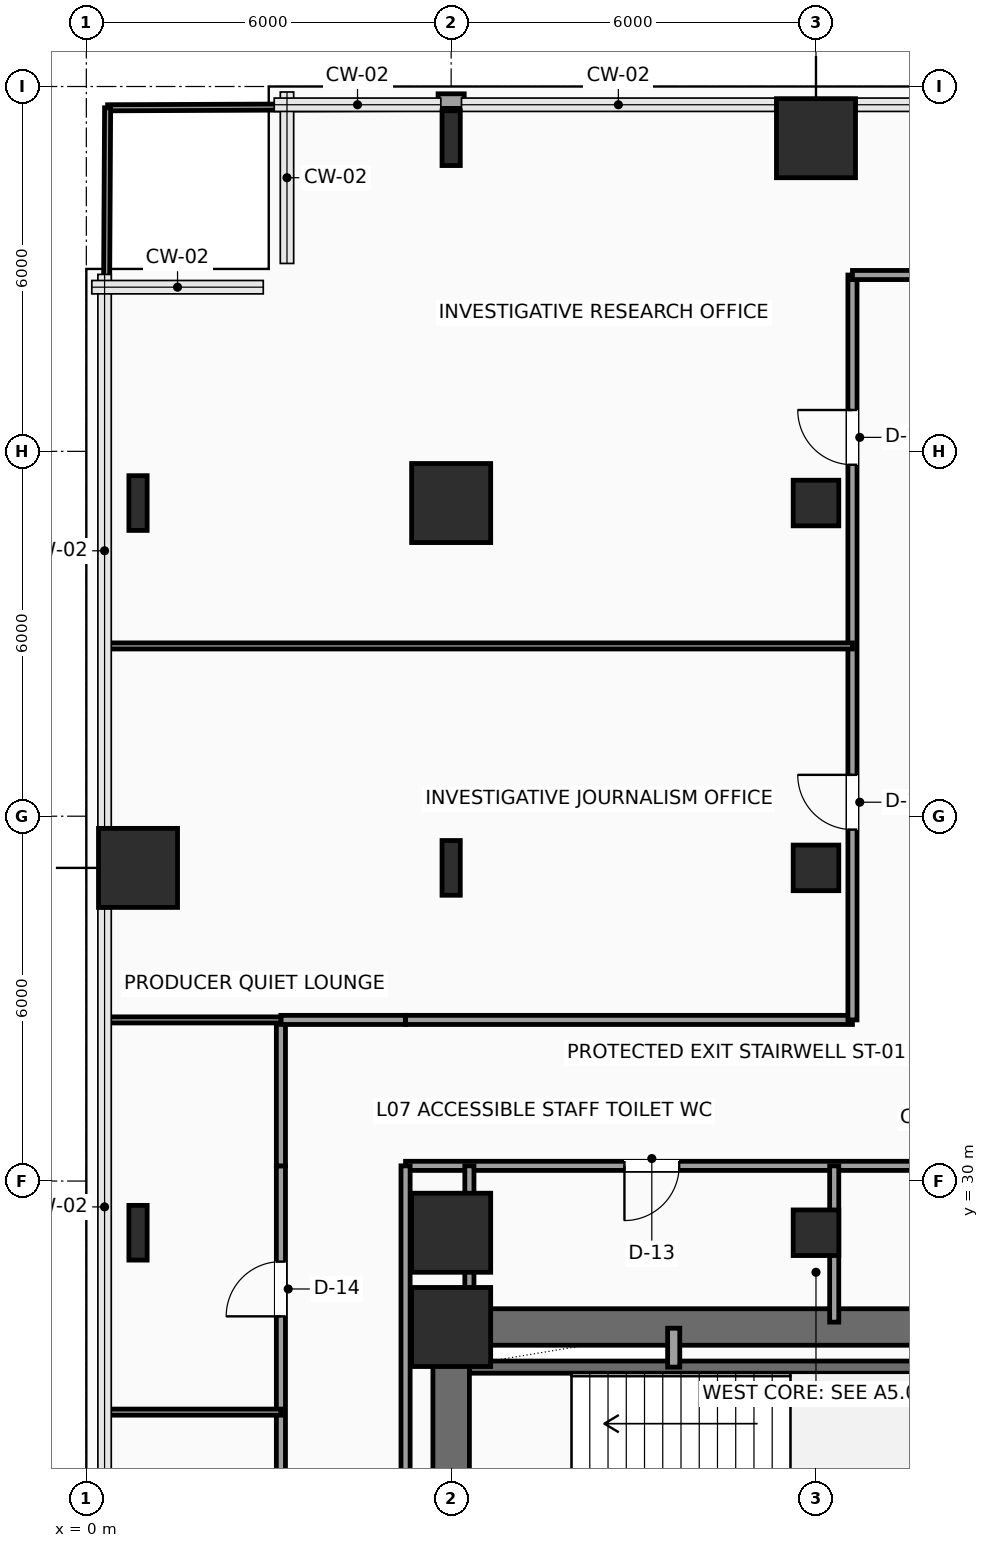
"""IFC4 building model, lengths in metres.
Left out: names, types, materials, properties, quantities, classifications, styles, units other than length and angle.
Written with IfcOpenShell. Run it as: python <this file> out.ifc"""

import sys

from ifc_helpers import new_model, si_unit, direction, frame, frame_2d, origin, origin_2d, place, context, subcontext, project, spatial, rectangle, hollow_rectangle, i_section, extrude, element, fill, save


model = new_model("IFC4")
c1 = context("Model", 3, precision=1e-05, world=origin(), true_north=direction((0.0, 1.0)))
c2 = subcontext(c1, "Body", "Model", "MODEL_VIEW")
j1 = project(units=[si_unit("LENGTHUNIT", "METRE"), si_unit("PLANEANGLEUNIT", "RADIAN")], contexts=[c1])
p1 = place(None, origin())
s1 = spatial("IfcSite", under=j1, at=p1, CompositionType="ELEMENT")
p2 = place(p1, origin())
s2 = spatial("IfcBuilding", under=s1, at=p2, CompositionType="ELEMENT")
p3 = place(p2, frame((0.0, 0.0, 36.3)))
s3 = spatial("IfcBuildingStorey", under=s2, at=p3, CompositionType="ELEMENT", Elevation=36.3)
p4 = place(p3, frame((6.0, 27.6, 0.0), z_axis=(0.0, 0.0, 1.0), x_axis=(1.0, 0.0, 0.0)))
e1 = element("IfcColumn", 1, at=p4, inside=s3, PredefinedType="COLUMN", context=c2, shape_type="SweptSolid", body=[
    extrude(rectangle(XDim=1.3, YDim=1.3, at=origin_2d()), origin(), (0.0, 0.0, 1.0), 3.9),
])
p5 = place(p3, frame((0.85, 29.15, 0.0), z_axis=(0.0, 0.0, 1.0), x_axis=(1.0, 0.0, 0.0)))
e2 = element("IfcColumn", 2, at=p5, inside=s3, PredefinedType="COLUMN", context=c2, shape_type="SweptSolid", body=[
    extrude(i_section(OverallWidth=0.3, OverallDepth=0.9, WebThickness=0.019, FlangeThickness=0.035, FilletRadius=0.03, at=origin_2d()), origin(), (0.0, 0.0, 1.0), 3.9),
])
p6 = place(p3, frame((0.85, 35.15, 0.0), z_axis=(0.0, 0.0, 1.0), x_axis=(1.0, 0.0, 0.0)))
e3 = element("IfcColumn", 3, at=p6, inside=s3, PredefinedType="COLUMN", context=c2, shape_type="SweptSolid", body=[
    extrude(rectangle(XDim=1.3, YDim=1.3, at=origin_2d()), origin(), (0.0, 0.0, 1.0), 3.9),
])
p7 = place(p3, frame((0.85, 41.15, 0.0), z_axis=(0.0, 0.0, 1.0), x_axis=(1.0, 0.0, 0.0)))
e4 = element("IfcColumn", 4, at=p7, inside=s3, PredefinedType="COLUMN", context=c2, shape_type="SweptSolid", body=[
    extrude(i_section(OverallWidth=0.3, OverallDepth=0.9, WebThickness=0.019, FlangeThickness=0.035, FilletRadius=0.03, at=origin_2d()), origin(), (0.0, 0.0, 1.0), 3.9),
])
p8 = place(p3, frame((6.0, 29.15, 0.0), z_axis=(0.0, 0.0, 1.0), x_axis=(1.0, 0.0, 0.0)))
e5 = element("IfcColumn", 5, at=p8, inside=s3, PredefinedType="COLUMN", context=c2, shape_type="SweptSolid", body=[
    extrude(rectangle(XDim=1.3, YDim=1.3, at=origin_2d()), origin(), (0.0, 0.0, 1.0), 3.9),
])
p9 = place(p3, frame((6.0, 35.15, 0.0), z_axis=(0.0, 0.0, 1.0), x_axis=(1.0, 0.0, 0.0)))
e6 = element("IfcColumn", 6, at=p9, inside=s3, PredefinedType="COLUMN", context=c2, shape_type="SweptSolid", body=[
    extrude(i_section(OverallWidth=0.3, OverallDepth=0.9, WebThickness=0.019, FlangeThickness=0.035, FilletRadius=0.03, at=origin_2d()), origin(), (0.0, 0.0, 1.0), 3.9),
])
p10 = place(p3, frame((6.0, 41.15, 0.0), z_axis=(0.0, 0.0, 1.0), x_axis=(1.0, 0.0, 0.0)))
e7 = element("IfcColumn", 7, at=p10, inside=s3, PredefinedType="COLUMN", context=c2, shape_type="SweptSolid", body=[
    extrude(rectangle(XDim=1.3, YDim=1.3, at=origin_2d()), origin(), (0.0, 0.0, 1.0), 3.9),
])
p11 = place(p3, frame((6.0, 47.15, 0.0), z_axis=(0.0, 0.0, 1.0), x_axis=(1.0, 0.0, 0.0)))
e8 = element("IfcColumn", 8, at=p11, inside=s3, PredefinedType="COLUMN", context=c2, shape_type="SweptSolid", body=[
    extrude(i_section(OverallWidth=0.3, OverallDepth=0.9, WebThickness=0.019, FlangeThickness=0.035, FilletRadius=0.03, at=origin_2d()), origin(), (0.0, 0.0, 1.0), 3.9),
])
for number, where, z_axis, x_axis in (
    (9, (12.0, 29.15, 0.0), (0.0, 0.0, 1.0), (1.0, 0.0, 0.0)),
    (10, (12.0, 35.15, 0.0), (0.0, 0.0, 1.0), (1.0, 0.0, 0.0)),
    (11, (12.0, 41.15, 0.0), (0.0, 0.0, 1.0), (1.0, 0.0, 0.0)),
):
    element("IfcColumn", number, at=place(p3, frame(where, z_axis=z_axis, x_axis=x_axis)), inside=s3, PredefinedType="COLUMN", context=c2, shape_type="SweptSolid", body=[
        extrude(hollow_rectangle(XDim=0.75, YDim=0.75, WallThickness=0.035, InnerFilletRadius=0.035, OuterFilletRadius=0.05, at=origin_2d()), origin(), (0.0, 0.0, 1.0), 3.9),
    ])
p12 = place(p3, frame((12.0, 47.15, 0.0), z_axis=(0.0, 0.0, 1.0), x_axis=(1.0, 0.0, 0.0)))
e12 = element("IfcColumn", 12, at=p12, inside=s3, PredefinedType="COLUMN", context=c2, shape_type="SweptSolid", body=[
    extrude(rectangle(XDim=1.3, YDim=1.3, at=origin_2d()), origin(), (0.0, 0.0, 1.0), 3.9),
])
p13 = place(p3, frame((5.785, 47.76, 0.0), z_axis=(0.0, 0.0, 1.0), x_axis=(1.0, 0.0, 0.0)))
e13 = element("IfcWall", 13, at=p13, inside=s3, PredefinedType="SOLIDWALL", context=c2, shape_type="SweptSolid", body=[
    extrude(rectangle(XDim=0.43, YDim=0.24, at=frame_2d((0.215, 0.0))), origin(), (0.0, 0.0, 1.0), 3.65),
])
p14 = place(p3, frame((6.0, 27.6, 0.0), z_axis=(0.0, 0.0, 1.0), x_axis=(1.0, 0.0, 0.0)))
e14 = element("IfcWall", 14, at=p14, inside=s3, PredefinedType="SHEAR", context=c2, shape_type="SweptSolid", body=[
    extrude(rectangle(XDim=12.0, YDim=0.6, at=frame_2d((6.0, 0.0))), origin(), (0.0, 0.0, 1.0), 3.65),
])
p15 = place(p14, frame((10.2, 0.0, 0.0)))
e15 = element("IfcOpeningElement", 15, at=p15, cuts=e14, PredefinedType="OPENING", context=c2, shape_type="SweptSolid", body=[
    extrude(rectangle(XDim=0.9, YDim=2.15, at=frame_2d((0.45, 1.075))), frame((0.0, 0.31, 0.0), z_axis=(0.0, -1.0, 0.0), x_axis=(1.0, 0.0, 0.0)), (0.0, 0.0, 1.0), 0.62),
])
p16 = place(p3, frame((6.0, 18.0, 0.0), z_axis=(0.0, 0.0, 1.0), x_axis=(0.0, 1.0, 0.0)))
e16 = element("IfcWall", 16, at=p16, inside=s3, PredefinedType="SHEAR", context=c2, shape_type="SweptSolid", body=[
    extrude(rectangle(XDim=9.6, YDim=0.6, at=frame_2d((4.8, 0.0))), origin(), (0.0, 0.0, 1.0), 3.65),
])
p17 = place(p3, frame((6.3, 26.94, 0.0), z_axis=(0.0, 0.0, 1.0), x_axis=(1.0, 0.0, 0.0)))
e17 = element("IfcWall", 17, at=p17, inside=s3, PredefinedType="SHEAR", context=c2, shape_type="SweptSolid", body=[
    extrude(rectangle(XDim=8.88, YDim=0.2, at=frame_2d((4.44, 0.0))), origin(), (0.0, 0.0, 1.0), 3.65),
])
p18 = place(p3, frame((9.66, 26.94, 0.0), z_axis=(0.0, 0.0, 1.0), x_axis=(0.0, 1.0, 0.0)))
e18 = element("IfcWall", 18, at=p18, inside=s3, PredefinedType="SOLIDWALL", context=c2, shape_type="SweptSolid", body=[
    extrude(rectangle(XDim=0.64, YDim=0.2, at=frame_2d((0.32, 0.0))), origin(), (0.0, 0.0, 1.0), 3.65),
])
p19 = place(p3, frame((3.2, 13.8, 0.0), z_axis=(0.0, 0.0, 1.0), x_axis=(0.0, 1.0, 0.0)))
e19 = element("IfcWall", 19, at=p19, inside=s3, PredefinedType="PARTITIONING", context=c2, shape_type="SweptSolid", body=[
    extrude(rectangle(XDim=16.45, YDim=0.15, at=frame_2d((8.225, 0.0))), origin(), (0.0, 0.0, 1.0), 3.65),
])
p20 = place(p19, frame((2.65, 0.0, 0.0)))
e20 = element("IfcOpeningElement", 20, at=p20, cuts=e19, PredefinedType="OPENING", context=c2, shape_type="SweptSolid", body=[
    extrude(rectangle(XDim=0.9, YDim=2.1, at=frame_2d((0.45, 1.05))), frame((0.0, 0.085, 0.0), z_axis=(0.0, -1.0, 0.0), x_axis=(1.0, 0.0, 0.0)), (0.0, 0.0, 1.0), 0.17),
])
p21 = place(p19, frame((8.85, 0.0, 0.0)))
e21 = element("IfcOpeningElement", 21, at=p21, cuts=e19, PredefinedType="OPENING", context=c2, shape_type="SweptSolid", body=[
    extrude(rectangle(XDim=0.9, YDim=2.1, at=frame_2d((0.45, 1.05))), frame((0.0, 0.085, 0.0), z_axis=(0.0, -1.0, 0.0), x_axis=(1.0, 0.0, 0.0)), (0.0, 0.0, 1.0), 0.17),
])
p22 = place(p19, frame((13.975, 0.0, 0.0)))
e22 = element("IfcOpeningElement", 22, at=p22, cuts=e19, PredefinedType="OPENING", context=c2, shape_type="SweptSolid", body=[
    extrude(rectangle(XDim=0.9, YDim=2.1, at=frame_2d((0.45, 1.05))), frame((0.0, 0.085, 0.0), z_axis=(0.0, -1.0, 0.0), x_axis=(1.0, 0.0, 0.0)), (0.0, 0.0, 1.0), 0.17),
])
p23 = place(p3, frame((3.2, 30.25, 0.0), z_axis=(0.0, 0.0, 1.0), x_axis=(0.0, 1.0, 0.0)))
e23 = element("IfcWall", 23, at=p23, inside=s3, PredefinedType="PARTITIONING", context=c2, shape_type="SweptSolid", body=[
    extrude(rectangle(XDim=2.4, YDim=0.15, at=frame_2d((1.2, 0.0))), origin(), (0.0, 0.0, 1.0), 3.65),
])
p24 = place(p3, frame((3.2, 32.65, 0.0), z_axis=(0.0, 0.0, 1.0), x_axis=(1.0, 0.0, 0.0)))
e24 = element("IfcWall", 24, at=p24, inside=s3, PredefinedType="PARTITIONING", context=c2, shape_type="SweptSolid", body=[
    extrude(rectangle(XDim=2.05, YDim=0.15, at=frame_2d((1.025, 0.0))), origin(), (0.0, 0.0, 1.0), 3.65),
])
p25 = place(p3, frame((5.25, 32.65, 0.0), z_axis=(0.0, 0.0, 1.0), x_axis=(1.0, 0.0, 0.0)))
e25 = element("IfcWall", 25, at=p25, inside=s3, PredefinedType="PARTITIONING", context=c2, shape_type="SweptSolid", body=[
    extrude(rectangle(XDim=7.35, YDim=0.15, at=frame_2d((3.675, 0.0))), origin(), (0.0, 0.0, 1.0), 3.65),
])
p26 = place(p3, frame((12.6, 32.65, 0.0), z_axis=(0.0, 0.0, 1.0), x_axis=(0.0, 1.0, 0.0)))
e26 = element("IfcWall", 26, at=p26, inside=s3, PredefinedType="PARTITIONING", context=c2, shape_type="SweptSolid", body=[
    extrude(rectangle(XDim=12.25, YDim=0.15, at=frame_2d((6.125, 0.0))), origin(), (0.0, 0.0, 1.0), 3.65),
])
p27 = place(p26, frame((3.13, 0.0, 0.0)))
e27 = element("IfcOpeningElement", 27, at=p27, cuts=e26, PredefinedType="OPENING", context=c2, shape_type="SweptSolid", body=[
    extrude(rectangle(XDim=0.9, YDim=2.1, at=frame_2d((0.45, 1.05))), frame((0.0, 0.085, 0.0), z_axis=(0.0, -1.0, 0.0), x_axis=(1.0, 0.0, 0.0)), (0.0, 0.0, 1.0), 0.17),
])
p28 = place(p26, frame((9.13, 0.0, 0.0)))
e28 = element("IfcOpeningElement", 28, at=p28, cuts=e26, PredefinedType="OPENING", context=c2, shape_type="SweptSolid", body=[
    extrude(rectangle(XDim=0.9, YDim=2.1, at=frame_2d((0.45, 1.05))), frame((0.0, 0.085, 0.0), z_axis=(0.0, -1.0, 0.0), x_axis=(1.0, 0.0, 0.0)), (0.0, 0.0, 1.0), 0.17),
])
p29 = place(p3, frame((12.6, 44.9, 0.0), z_axis=(0.0, 0.0, 1.0), x_axis=(1.0, 0.0, 0.0)))
e29 = element("IfcWall", 29, at=p29, inside=s3, PredefinedType="PARTITIONING", context=c2, shape_type="SweptSolid", body=[
    extrude(rectangle(XDim=2.35, YDim=0.15, at=frame_2d((1.175, 0.0))), origin(), (0.0, 0.0, 1.0), 3.65),
])
p30 = place(p3, frame((15.88, 30.25, 0.0), z_axis=(0.0, 0.0, 1.0), x_axis=(-1.0, 0.0, 0.0)))
e30 = element("IfcWall", 30, at=p30, inside=s3, PredefinedType="PARTITIONING", context=c2, shape_type="SweptSolid", body=[
    extrude(rectangle(XDim=10.63, YDim=0.15, at=frame_2d((5.315, 0.0))), origin(), (0.0, 0.0, 1.0), 3.65),
])
p31 = place(p30, frame((6.13, 0.0, 0.0)))
e31 = element("IfcOpeningElement", 31, at=p31, cuts=e30, PredefinedType="OPENING", context=c2, shape_type="SweptSolid", body=[
    extrude(rectangle(XDim=0.9, YDim=2.1, at=frame_2d((0.45, 1.05))), frame((0.0, 0.085, 0.0), z_axis=(0.0, -1.0, 0.0), x_axis=(1.0, 0.0, 0.0)), (0.0, 0.0, 1.0), 0.17),
])
p32 = place(p3, frame((5.25, 30.25, 0.0), z_axis=(0.0, 0.0, 1.0), x_axis=(0.0, -1.0, 0.0)))
e32 = element("IfcWall", 32, at=p32, inside=s3, PredefinedType="PARTITIONING", context=c2, shape_type="SweptSolid", body=[
    extrude(rectangle(XDim=14.1, YDim=0.15, at=frame_2d((7.05, 0.0))), origin(), (0.0, 0.0, 1.0), 3.65),
])
for number, where, z_axis, x_axis in (
    (33, (6.3, 27.68, 0.0), (0.0, 0.0, 1.0), (0.0, 1.0, 0.0)),
    (34, (12.3, 27.68, 0.0), (0.0, 0.0, 1.0), (0.0, 1.0, 0.0)),
):
    element("IfcWall", number, at=place(p3, frame(where, z_axis=z_axis, x_axis=x_axis)), inside=s3, PredefinedType="PARTITIONING", context=c2, shape_type="SweptSolid", body=[
        extrude(rectangle(XDim=2.57, YDim=0.15, at=frame_2d((1.285, 0.0))), origin(), (0.0, 0.0, 1.0), 2.992),
    ])
p33 = place(p3, frame((0.3, 38.8, 0.0), z_axis=(0.0, 0.0, 1.0), x_axis=(1.0, 0.0, 0.0)))
e35 = element("IfcWall", 35, at=p33, inside=s3, PredefinedType="PARTITIONING", context=c2, shape_type="SweptSolid", body=[
    extrude(rectangle(XDim=12.3, YDim=0.1, at=frame_2d((6.15, 0.0))), origin(), (0.0, 0.0, 1.0), 3.65),
])
p34 = place(p3, frame((0.35, 47.65, 0.0), z_axis=(0.0, 0.0, 1.0), x_axis=(0.999991644778, 0.004087832518, 0.0)))
e36 = element("IfcWall", 36, at=p34, inside=s3, PredefinedType="PARTITIONING", context=c2, shape_type="SweptSolid", body=[
    extrude(rectangle(XDim=5.435, YDim=0.1, at=frame_2d((2.717, 0.0))), origin(), (0.0, 0.0, 1.0), 3.65),
])
p35 = place(p3, frame((6.215, 47.674, 0.0), z_axis=(0.0, 0.0, 1.0), x_axis=(0.999991630701, 0.004091274595, 0.0)))
e37 = element("IfcWall", 37, at=p35, inside=s3, PredefinedType="PARTITIONING", context=c2, shape_type="SweptSolid", body=[
    extrude(rectangle(XDim=6.385, YDim=0.1, at=frame_2d((3.192, 0.0))), origin(), (0.0, 0.0, 1.0), 3.65),
])
p36 = place(p3, frame((0.3, 38.8, 0.0), z_axis=(0.0, 0.0, 1.0), x_axis=(0.005655237989, 0.999984009014, 0.0)))
e38 = element("IfcWall", 38, at=p36, inside=s3, PredefinedType="PARTITIONING", context=c2, shape_type="SweptSolid", body=[
    extrude(rectangle(XDim=8.85, YDim=0.1, at=frame_2d((4.425, 0.0))), origin(), (0.0, 0.0, 1.0), 3.65),
])
for number, where, z_axis, x_axis in (
    (39, (0.3, 26.2, 0.0), (0.0, 0.0, 1.0), (1.0, 0.0, 0.0)),
    (40, (0.3, 32.65, 0.0), (0.0, 0.0, 1.0), (1.0, 0.0, 0.0)),
):
    element("IfcWall", number, at=place(p3, frame(where, z_axis=z_axis, x_axis=x_axis)), inside=s3, PredefinedType="PARTITIONING", context=c2, shape_type="SweptSolid", body=[
        extrude(rectangle(XDim=2.9, YDim=0.1, at=frame_2d((1.45, 0.0))), origin(), (0.0, 0.0, 1.0), 3.65),
    ])
p37 = place(p22, origin())
e41 = element("IfcDoor", 41, at=p37, inside=s3, OperationType="SINGLE_SWING_LEFT", PredefinedType="DOOR", context=c2, shape_type="SweptSolid", body=[
    extrude(rectangle(XDim=0.9, YDim=2.1, at=frame_2d((0.45, 1.05))), frame((0.0, 0.025, 0.0), z_axis=(0.0, -1.0, 0.0), x_axis=(1.0, 0.0, 0.0)), (0.0, 0.0, 1.0), 0.05),
])
fill(e22, e41)
p38 = place(p27, origin())
e42 = element("IfcDoor", 42, at=p38, inside=s3, OperationType="SINGLE_SWING_RIGHT", PredefinedType="DOOR", context=c2, shape_type="SweptSolid", body=[
    extrude(rectangle(XDim=0.9, YDim=2.1, at=frame_2d((0.45, 1.05))), frame((0.0, 0.025, 0.0), z_axis=(0.0, -1.0, 0.0), x_axis=(1.0, 0.0, 0.0)), (0.0, 0.0, 1.0), 0.05),
])
fill(e27, e42)
p39 = place(p28, origin())
e43 = element("IfcDoor", 43, at=p39, inside=s3, OperationType="SINGLE_SWING_RIGHT", PredefinedType="DOOR", context=c2, shape_type="SweptSolid", body=[
    extrude(rectangle(XDim=0.9, YDim=2.1, at=frame_2d((0.45, 1.05))), frame((0.0, 0.025, 0.0), z_axis=(0.0, -1.0, 0.0), x_axis=(1.0, 0.0, 0.0)), (0.0, 0.0, 1.0), 0.05),
])
fill(e28, e43)
p40 = place(p31, origin())
e44 = element("IfcDoor", 44, at=p40, inside=s3, OperationType="SINGLE_SWING_RIGHT", PredefinedType="DOOR", context=c2, shape_type="SweptSolid", body=[
    extrude(rectangle(XDim=0.9, YDim=2.1, at=frame_2d((0.45, 1.05))), frame((0.0, 0.025, 0.0), z_axis=(0.0, -1.0, 0.0), x_axis=(1.0, 0.0, 0.0)), (0.0, 0.0, 1.0), 0.05),
])
fill(e31, e44)
save(model, sys.argv[1])
